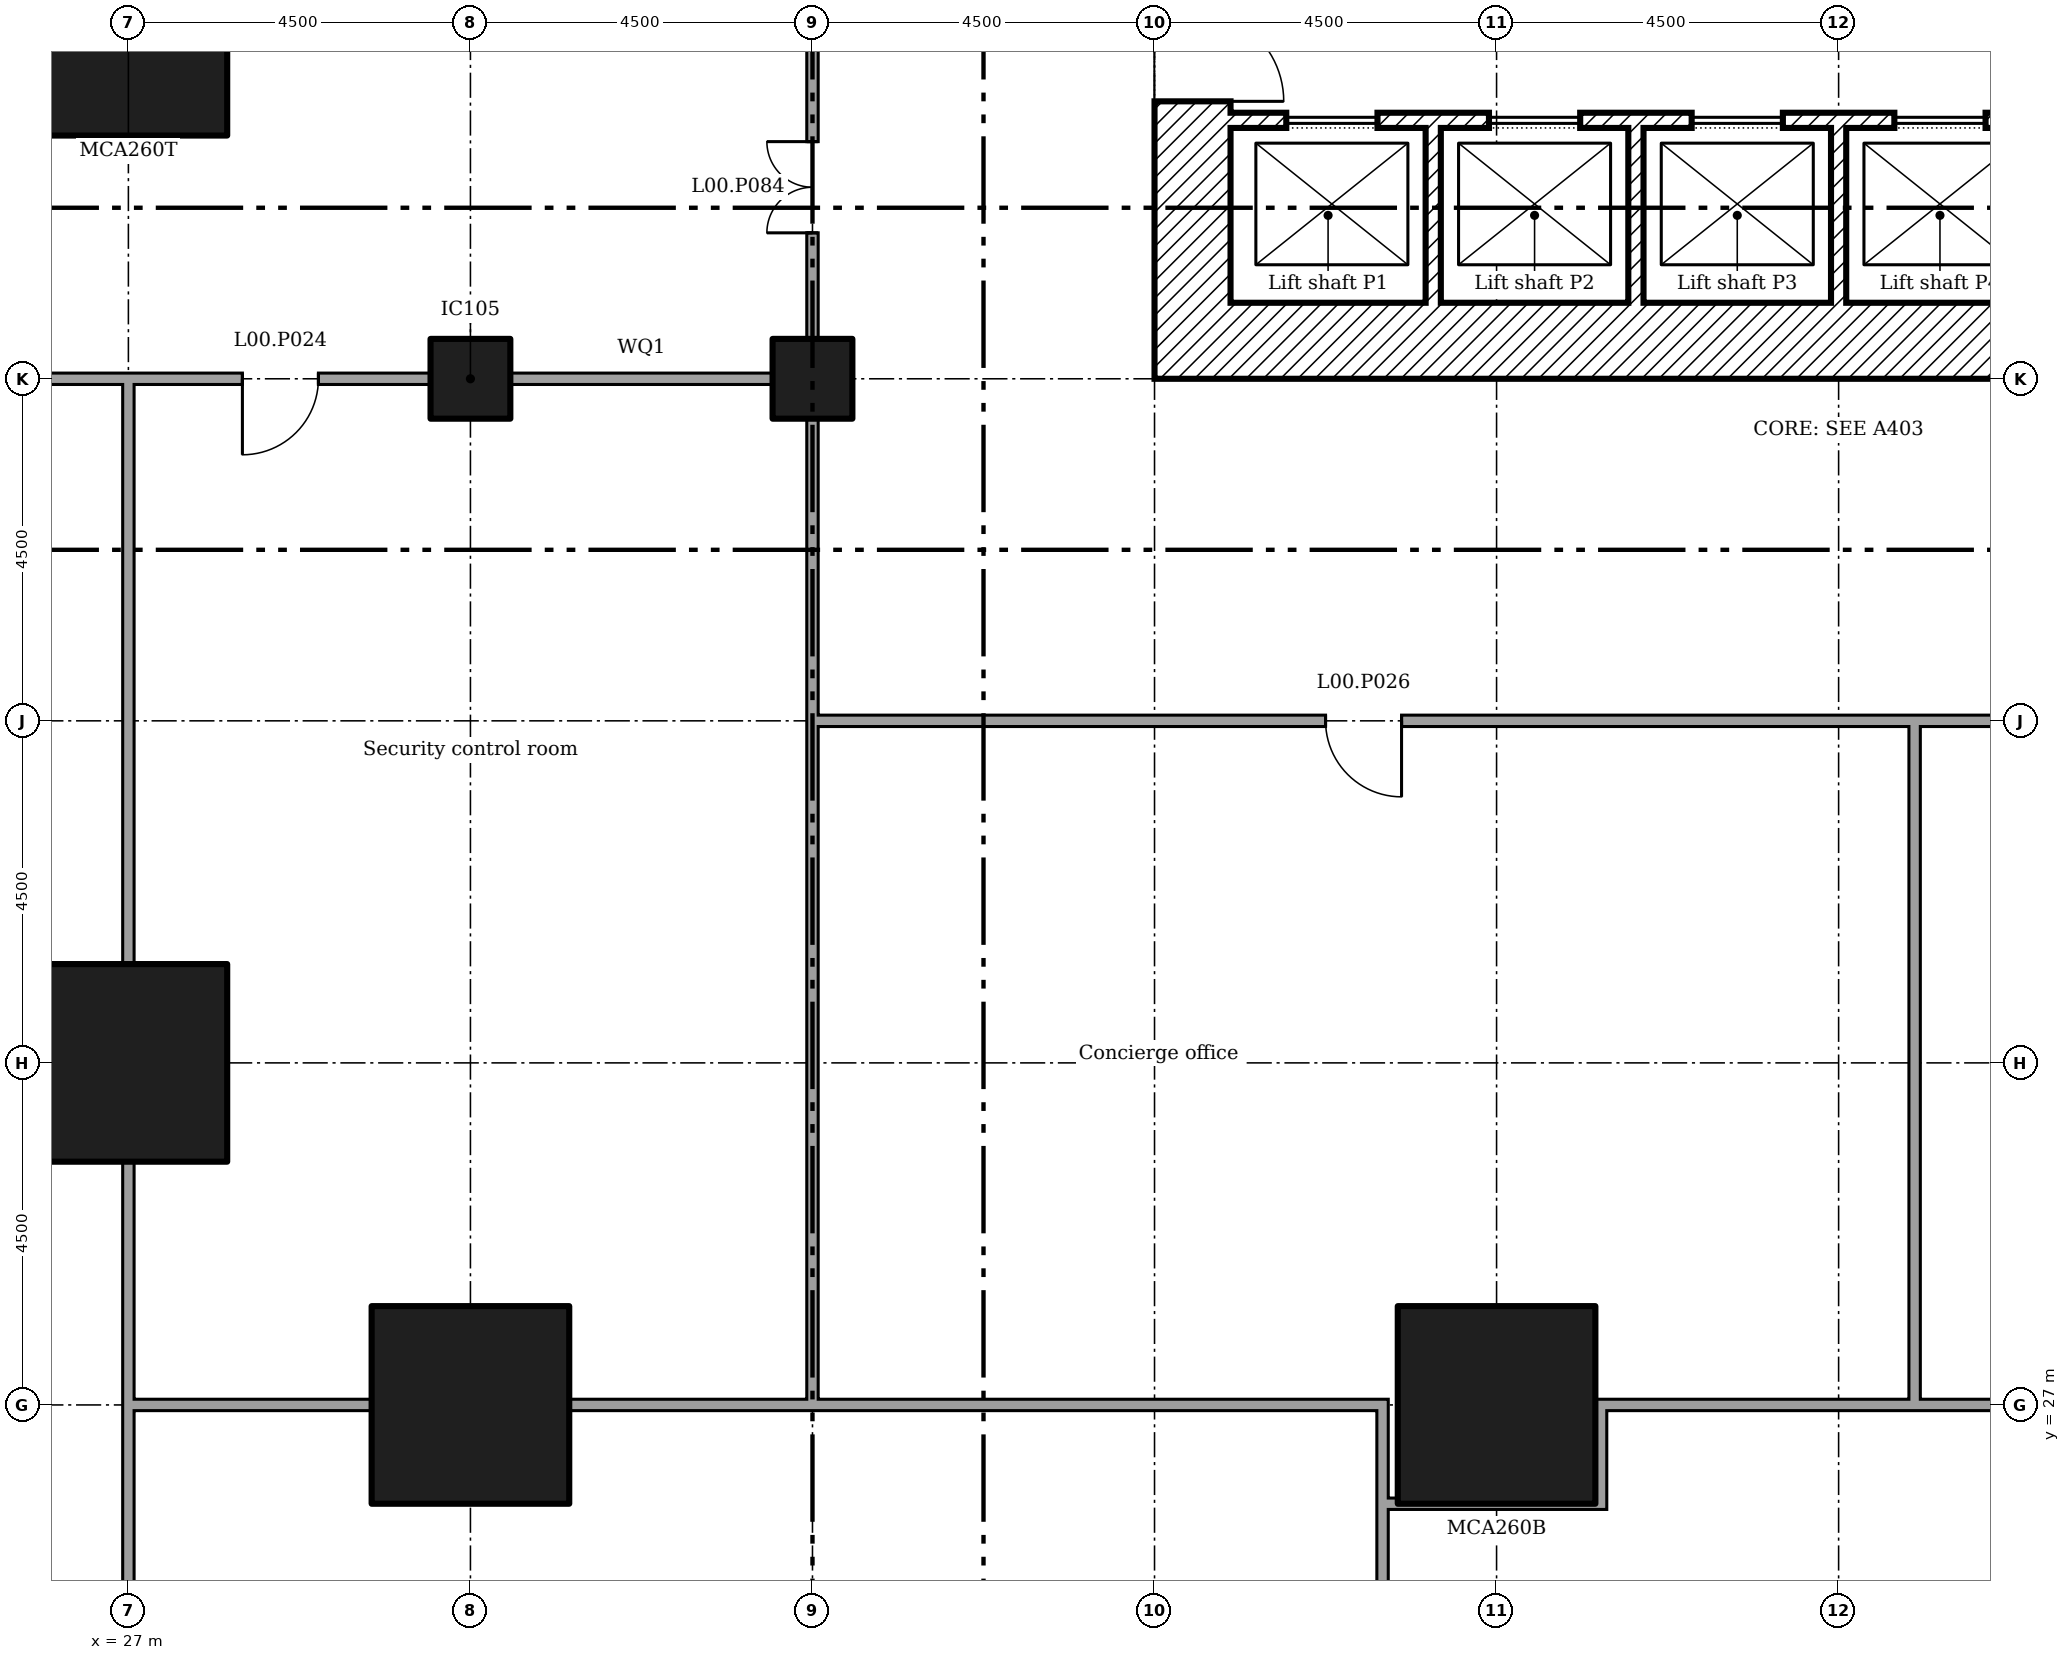
"""IFC4 building model, lengths in metres.
Left out: names, types, materials, properties, quantities, classifications, styles, units other than length and angle.
Written with IfcOpenShell. Run it as: python <this file> out.ifc"""

import sys

from ifc_helpers import new_model, si_unit, direction, frame, frame_2d, origin, origin_2d, place, context, subcontext, project, spatial, rectangle, extrude, element, fill, save


model = new_model("IFC4")
c1 = context("Model", 3, precision=1e-05, world=origin(), true_north=direction((0.0, 1.0)))
c2 = subcontext(c1, "Body", "Model", "MODEL_VIEW")
j1 = project(units=[si_unit("LENGTHUNIT", "METRE"), si_unit("PLANEANGLEUNIT", "RADIAN")], contexts=[c1])
p1 = place(None, origin())
s1 = spatial("IfcSite", under=j1, at=p1, CompositionType="ELEMENT")
p2 = place(p1, origin())
s2 = spatial("IfcBuilding", under=s1, at=p2, CompositionType="ELEMENT")
p3 = place(p2, origin())
s3 = spatial("IfcBuildingStorey", under=s2, at=p3, CompositionType="ELEMENT", Elevation=0.0)
for number, where in (
    (1, (27.0, 31.5, 0.0)),
    (2, (27.0, 45.0, 0.0)),
    (3, (31.5, 27.0, 0.0)),
    (4, (45.0, 27.0, 0.0)),
):
    element("IfcColumn", number, at=place(p3, frame(where)), inside=s3, PredefinedType="COLUMN", context=c2, shape_type="SweptSolid", body=[
        extrude(rectangle(XDim=2.6, YDim=2.6, at=origin_2d()), origin(), (0.0, 0.0, 1.0), 6.0),
    ])
for number, where in (
    (5, (31.5, 40.5, 0.0)),
    (6, (36.0, 40.5, 0.0)),
):
    element("IfcColumn", number, at=place(p3, frame(where)), inside=s3, PredefinedType="COLUMN", context=c2, shape_type="SweptSolid", body=[
        extrude(rectangle(XDim=1.05, YDim=1.05, at=origin_2d()), origin(), (0.0, 0.0, 1.0), 6.0),
    ])
p4 = place(p3, frame((41.5, 41.0, 0.0)))
e7 = element("IfcWall", 7, at=p4, inside=s3, PredefinedType="SHEAR", context=c2, shape_type="SweptSolid", body=[
    extrude(rectangle(XDim=16.0, YDim=1.0, at=frame_2d((8.0, 0.0))), origin(), (0.0, 0.0, 1.0), 5.5),
])
p5 = place(p3, frame((41.0, 40.5, 0.0), z_axis=(0.0, 0.0, 1.0), x_axis=(0.0, 1.0, 0.0)))
e8 = element("IfcWall", 8, at=p5, inside=s3, PredefinedType="SHEAR", context=c2, shape_type="SweptSolid", body=[
    extrude(rectangle(XDim=18.0, YDim=1.0, at=frame_2d((9.0, 0.0))), origin(), (0.0, 0.0, 1.0), 5.5),
])
p6 = place(p5, frame((3.65, 0.0, 0.0)))
e9 = element("IfcOpeningElement", 9, at=p6, cuts=e8, PredefinedType="OPENING", context=c2, shape_type="SweptSolid", body=[
    extrude(rectangle(XDim=1.2, YDim=2.1, at=frame_2d((0.6, 1.05))), frame((0.0, 0.51, 0.0), z_axis=(0.0, -1.0, 0.0), x_axis=(1.0, 0.0, 0.0)), (0.0, 0.0, 1.0), 1.02),
])
p7 = place(p5, frame((5.475, 0.0, 0.0)))
e10 = element("IfcOpeningElement", 10, at=p7, cuts=e8, PredefinedType="OPENING", context=c2, shape_type="SweptSolid", body=[
    extrude(rectangle(XDim=1.0, YDim=2.1, at=frame_2d((0.5, 1.05))), frame((0.0, 0.51, 0.0), z_axis=(0.0, -1.0, 0.0), x_axis=(1.0, 0.0, 0.0)), (0.0, 0.0, 1.0), 1.02),
])
p8 = place(p5, frame((12.3, 0.0, 0.0)))
e11 = element("IfcOpeningElement", 11, at=p8, cuts=e8, PredefinedType="OPENING", context=c2, shape_type="SweptSolid", body=[
    extrude(rectangle(XDim=1.0, YDim=2.1, at=frame_2d((0.5, 1.05))), frame((0.0, 0.51, 0.0), z_axis=(0.0, -1.0, 0.0), x_axis=(1.0, 0.0, 0.0)), (0.0, 0.0, 1.0), 1.02),
])
for number, where, z_axis, x_axis in (
    (12, (44.167, 41.5, 0.0), (0.0, 0.0, 1.0), (0.0, 1.0, 0.0)),
    (13, (46.833, 41.5, 0.0), (0.0, 0.0, 1.0), (0.0, 1.0, 0.0)),
    (14, (49.5, 41.5, 0.0), (0.0, 0.0, 1.0), (0.0, 1.0, 0.0)),
):
    element("IfcWall", number, at=place(p3, frame(where, z_axis=z_axis, x_axis=x_axis)), inside=s3, PredefinedType="SHEAR", context=c2, shape_type="SweptSolid", body=[
        extrude(rectangle(XDim=2.3, YDim=0.2, at=frame_2d((1.15, 0.0))), origin(), (0.0, 0.0, 1.0), 5.5),
    ])
p9 = place(p3, frame((41.5, 43.9, 0.0)))
e15 = element("IfcWall", 15, at=p9, inside=s3, PredefinedType="SHEAR", context=c2, shape_type="SweptSolid", body=[
    extrude(rectangle(XDim=16.0, YDim=0.2, at=frame_2d((8.0, 0.0))), origin(), (0.0, 0.0, 1.0), 5.5),
])
p10 = place(p9, frame((14.067, 0.0, 0.0)))
e16 = element("IfcOpeningElement", 16, at=p10, cuts=e15, PredefinedType="OPENING", context=c2, shape_type="SweptSolid", body=[
    extrude(rectangle(XDim=1.2, YDim=2.1, at=frame_2d((0.6, 1.05))), frame((0.0, 0.11, 0.0), z_axis=(0.0, -1.0, 0.0), x_axis=(1.0, 0.0, 0.0)), (0.0, 0.0, 1.0), 0.22),
])
p11 = place(p9, frame((0.733, 0.0, 0.0)))
e17 = element("IfcOpeningElement", 17, at=p11, cuts=e15, PredefinedType="OPENING", context=c2, shape_type="SweptSolid", body=[
    extrude(rectangle(XDim=1.2, YDim=2.1, at=frame_2d((0.6, 1.05))), frame((0.0, 0.11, 0.0), z_axis=(0.0, -1.0, 0.0), x_axis=(1.0, 0.0, 0.0)), (0.0, 0.0, 1.0), 0.22),
])
p12 = place(p9, frame((3.4, 0.0, 0.0)))
e18 = element("IfcOpeningElement", 18, at=p12, cuts=e15, PredefinedType="OPENING", context=c2, shape_type="SweptSolid", body=[
    extrude(rectangle(XDim=1.2, YDim=2.1, at=frame_2d((0.6, 1.05))), frame((0.0, 0.11, 0.0), z_axis=(0.0, -1.0, 0.0), x_axis=(1.0, 0.0, 0.0)), (0.0, 0.0, 1.0), 0.22),
])
p13 = place(p9, frame((6.067, 0.0, 0.0)))
e19 = element("IfcOpeningElement", 19, at=p13, cuts=e15, PredefinedType="OPENING", context=c2, shape_type="SweptSolid", body=[
    extrude(rectangle(XDim=1.2, YDim=2.1, at=frame_2d((0.6, 1.05))), frame((0.0, 0.11, 0.0), z_axis=(0.0, -1.0, 0.0), x_axis=(1.0, 0.0, 0.0)), (0.0, 0.0, 1.0), 0.22),
])
p14 = place(p9, frame((8.733, 0.0, 0.0)))
e20 = element("IfcOpeningElement", 20, at=p14, cuts=e15, PredefinedType="OPENING", context=c2, shape_type="SweptSolid", body=[
    extrude(rectangle(XDim=1.2, YDim=2.1, at=frame_2d((0.6, 1.05))), frame((0.0, 0.11, 0.0), z_axis=(0.0, -1.0, 0.0), x_axis=(1.0, 0.0, 0.0)), (0.0, 0.0, 1.0), 0.22),
])
p15 = place(p9, frame((11.4, 0.0, 0.0)))
e21 = element("IfcOpeningElement", 21, at=p15, cuts=e15, PredefinedType="OPENING", context=c2, shape_type="SweptSolid", body=[
    extrude(rectangle(XDim=1.2, YDim=2.1, at=frame_2d((0.6, 1.05))), frame((0.0, 0.11, 0.0), z_axis=(0.0, -1.0, 0.0), x_axis=(1.0, 0.0, 0.0)), (0.0, 0.0, 1.0), 0.22),
])
p16 = place(p3, frame((18.075, 40.5, 0.0)))
e22 = element("IfcWall", 22, at=p16, inside=s3, PredefinedType="PARTITIONING", context=c2, shape_type="SweptSolid", body=[
    extrude(rectangle(XDim=9.0, YDim=0.15, at=frame_2d((4.5, 0.0))), origin(), (0.0, 0.0, 1.0), 5.55),
])
p17 = place(p3, frame((27.0, 18.075, 0.0), z_axis=(0.0, 0.0, 1.0), x_axis=(0.0, 1.0, 0.0)))
e23 = element("IfcWall", 23, at=p17, inside=s3, PredefinedType="PARTITIONING", context=c2, shape_type="SweptSolid", body=[
    extrude(rectangle(XDim=9.0, YDim=0.15, at=frame_2d((4.5, 0.0))), origin(), (0.0, 0.0, 1.0), 5.55),
])
p18 = place(p3, frame((27.0, 27.0, 0.0), z_axis=(0.0, 0.0, 1.0), x_axis=(0.0, 1.0, 0.0)))
e24 = element("IfcWall", 24, at=p18, inside=s3, PredefinedType="PARTITIONING", context=c2, shape_type="SweptSolid", body=[
    extrude(rectangle(XDim=3.205, YDim=0.15, at=frame_2d((1.603, 0.0))), origin(), (0.0, 0.0, 1.0), 5.55),
])
p19 = place(p3, frame((27.0, 32.795, 0.0), z_axis=(0.0, 0.0, 1.0), x_axis=(0.0, 1.0, 0.0)))
e25 = element("IfcWall", 25, at=p19, inside=s3, PredefinedType="PARTITIONING", context=c2, shape_type="SweptSolid", body=[
    extrude(rectangle(XDim=7.63, YDim=0.15, at=frame_2d((3.815, 0.0))), origin(), (0.0, 0.0, 1.0), 5.55),
])
p20 = place(p3, frame((27.0, 40.5, 0.0)))
e26 = element("IfcWall", 26, at=p20, inside=s3, PredefinedType="PARTITIONING", context=c2, shape_type="SweptSolid", body=[
    extrude(rectangle(XDim=3.98, YDim=0.15, at=frame_2d((1.99, 0.0))), origin(), (0.0, 0.0, 1.0), 5.55),
])
p21 = place(p20, frame((1.5, 0.0, 0.0)))
e27 = element("IfcOpeningElement", 27, at=p21, cuts=e26, PredefinedType="OPENING", context=c2, shape_type="SweptSolid", body=[
    extrude(rectangle(XDim=1.0, YDim=2.1, at=frame_2d((0.5, 1.05))), frame((0.0, 0.085, 0.0), z_axis=(0.0, -1.0, 0.0), x_axis=(1.0, 0.0, 0.0)), (0.0, 0.0, 1.0), 0.17),
])
p22 = place(p3, frame((32.02, 40.5, 0.0)))
e28 = element("IfcWall", 28, at=p22, inside=s3, PredefinedType="PARTITIONING", context=c2, shape_type="SweptSolid", body=[
    extrude(rectangle(XDim=3.46, YDim=0.15, at=frame_2d((1.73, 0.0))), origin(), (0.0, 0.0, 1.0), 5.55),
])
p23 = place(p3, frame((36.0, 41.02, 0.0), z_axis=(0.0, 0.0, 1.0), x_axis=(0.0, 1.0, 0.0)))
e29 = element("IfcWall", 29, at=p23, inside=s3, PredefinedType="PARTITIONING", context=c2, shape_type="SweptSolid", body=[
    extrude(rectangle(XDim=3.905, YDim=0.15, at=frame_2d((1.953, 0.0))), origin(), (0.0, 0.0, 1.0), 5.55),
])
p24 = place(p23, frame((1.4, 0.0, 0.0)))
e30 = element("IfcOpeningElement", 30, at=p24, cuts=e29, PredefinedType="OPENING", context=c2, shape_type="SweptSolid", body=[
    extrude(rectangle(XDim=1.2, YDim=2.1, at=frame_2d((0.6, 1.05))), frame((0.0, 0.085, 0.0), z_axis=(0.0, -1.0, 0.0), x_axis=(1.0, 0.0, 0.0)), (0.0, 0.0, 1.0), 0.17),
])
p25 = place(p3, frame((43.5, 18.075, 0.0), z_axis=(0.0, 0.0, 1.0), x_axis=(0.0, 1.0, 0.0)))
e31 = element("IfcWall", 31, at=p25, inside=s3, PredefinedType="PARTITIONING", context=c2, shape_type="SweptSolid", body=[
    extrude(rectangle(XDim=7.7, YDim=0.15, at=frame_2d((3.85, 0.0))), origin(), (0.0, 0.0, 1.0), 5.55),
])
p26 = place(p3, frame((27.075, 27.0, 0.0)))
e32 = element("IfcWall", 32, at=p26, inside=s3, PredefinedType="PARTITIONING", context=c2, shape_type="SweptSolid", body=[
    extrude(rectangle(XDim=3.13, YDim=0.15, at=frame_2d((1.565, 0.0))), origin(), (0.0, 0.0, 1.0), 5.55),
])
p27 = place(p3, frame((32.795, 27.0, 0.0)))
e33 = element("IfcWall", 33, at=p27, inside=s3, PredefinedType="PARTITIONING", context=c2, shape_type="SweptSolid", body=[
    extrude(rectangle(XDim=3.28, YDim=0.15, at=frame_2d((1.64, 0.0))), origin(), (0.0, 0.0, 1.0), 5.55),
])
p28 = place(p3, frame((43.5, 25.7, 0.0), z_axis=(0.0, 0.0, 1.0), x_axis=(0.0, 1.0, 0.0)))
e34 = element("IfcWall", 34, at=p28, inside=s3, PredefinedType="PARTITIONING", context=c2, shape_type="SweptSolid", body=[
    extrude(rectangle(XDim=1.375, YDim=0.15, at=frame_2d((0.688, 0.0))), origin(), (0.0, 0.0, 1.0), 5.55),
])
p29 = place(p3, frame((36.0, 27.0, 0.0)))
e35 = element("IfcWall", 35, at=p29, inside=s3, PredefinedType="PARTITIONING", context=c2, shape_type="SweptSolid", body=[
    extrude(rectangle(XDim=7.425, YDim=0.15, at=frame_2d((3.712, 0.0))), origin(), (0.0, 0.0, 1.0), 5.55),
])
p30 = place(p3, frame((46.375, 25.625, 0.0), z_axis=(0.0, 0.0, 1.0), x_axis=(0.0, 1.0, 0.0)))
e36 = element("IfcWall", 36, at=p30, inside=s3, PredefinedType="PARTITIONING", context=c2, shape_type="SweptSolid", body=[
    extrude(rectangle(XDim=1.45, YDim=0.15, at=frame_2d((0.725, 0.0))), origin(), (0.0, 0.0, 1.0), 5.55),
])
p31 = place(p3, frame((43.575, 25.7, 0.0)))
e37 = element("IfcWall", 37, at=p31, inside=s3, PredefinedType="PARTITIONING", context=c2, shape_type="SweptSolid", body=[
    extrude(rectangle(XDim=2.725, YDim=0.15, at=frame_2d((1.363, 0.0))), origin(), (0.0, 0.0, 1.0), 5.55),
])
p32 = place(p3, frame((46.45, 27.0, 0.0)))
e38 = element("IfcWall", 38, at=p32, inside=s3, PredefinedType="PARTITIONING", context=c2, shape_type="SweptSolid", body=[
    extrude(rectangle(XDim=4.125, YDim=0.15, at=frame_2d((2.062, 0.0))), origin(), (0.0, 0.0, 1.0), 5.55),
])
p33 = place(p3, frame((50.5, 27.0, 0.0)))
e39 = element("IfcWall", 39, at=p33, inside=s3, PredefinedType="PARTITIONING", context=c2, shape_type="SweptSolid", body=[
    extrude(rectangle(XDim=6.55, YDim=0.15, at=frame_2d((3.275, 0.0))), origin(), (0.0, 0.0, 1.0), 5.55),
])
p34 = place(p3, frame((36.0, 27.075, 0.0), z_axis=(0.0, 0.0, 1.0), x_axis=(0.0, 1.0, 0.0)))
e40 = element("IfcWall", 40, at=p34, inside=s3, PredefinedType="PARTITIONING", context=c2, shape_type="SweptSolid", body=[
    extrude(rectangle(XDim=9.0, YDim=0.15, at=frame_2d((4.5, 0.0))), origin(), (0.0, 0.0, 1.0), 5.55),
])
p35 = place(p3, frame((36.0, 36.0, 0.0), z_axis=(0.0, 0.0, 1.0), x_axis=(0.0, 1.0, 0.0)))
e41 = element("IfcWall", 41, at=p35, inside=s3, PredefinedType="PARTITIONING", context=c2, shape_type="SweptSolid", body=[
    extrude(rectangle(XDim=3.98, YDim=0.15, at=frame_2d((1.99, 0.0))), origin(), (0.0, 0.0, 1.0), 5.55),
])
p36 = place(p3, frame((50.5, 27.075, 0.0), z_axis=(0.0, 0.0, 1.0), x_axis=(0.0, 1.0, 0.0)))
e42 = element("IfcWall", 42, at=p36, inside=s3, PredefinedType="PARTITIONING", context=c2, shape_type="SweptSolid", body=[
    extrude(rectangle(XDim=9.0, YDim=0.15, at=frame_2d((4.5, 0.0))), origin(), (0.0, 0.0, 1.0), 5.55),
])
p37 = place(p3, frame((36.075, 36.0, 0.0)))
e43 = element("IfcWall", 43, at=p37, inside=s3, PredefinedType="PARTITIONING", context=c2, shape_type="SweptSolid", body=[
    extrude(rectangle(XDim=14.425, YDim=0.15, at=frame_2d((7.212, 0.0))), origin(), (0.0, 0.0, 1.0), 5.55),
])
p38 = place(p37, frame((6.675, 0.0, 0.0)))
e44 = element("IfcOpeningElement", 44, at=p38, cuts=e43, PredefinedType="OPENING", context=c2, shape_type="SweptSolid", body=[
    extrude(rectangle(XDim=1.0, YDim=2.1, at=frame_2d((0.5, 1.05))), frame((0.0, 0.085, 0.0), z_axis=(0.0, -1.0, 0.0), x_axis=(1.0, 0.0, 0.0)), (0.0, 0.0, 1.0), 0.17),
])
p39 = place(p3, frame((50.575, 36.0, 0.0)))
e45 = element("IfcWall", 45, at=p39, inside=s3, PredefinedType="PARTITIONING", context=c2, shape_type="SweptSolid", body=[
    extrude(rectangle(XDim=7.405, YDim=0.15, at=frame_2d((3.703, 0.0))), origin(), (0.0, 0.0, 1.0), 5.55),
])
p40 = place(p6, frame((1.2, 0.0, 0.0), x_axis=(-1.0, 0.0, 0.0)))
e46 = element("IfcDoor", 46, at=p40, inside=s3, OperationType="SINGLE_SWING_LEFT", PredefinedType="DOOR", context=c2, shape_type="SweptSolid", body=[
    extrude(rectangle(XDim=1.2, YDim=2.1, at=frame_2d((0.6, 1.05))), frame((0.0, 0.025, 0.0), z_axis=(0.0, -1.0, 0.0), x_axis=(1.0, 0.0, 0.0)), (0.0, 0.0, 1.0), 0.05),
])
fill(e9, e46)
p41 = place(p11, origin())
e47 = element("IfcDoor", 47, at=p41, inside=s3, OperationType="SLIDING_TO_LEFT", PredefinedType="DOOR", context=c2, shape_type="SweptSolid", body=[
    extrude(rectangle(XDim=1.2, YDim=2.1, at=frame_2d((0.6, 1.05))), frame((0.0, 0.025, 0.0), z_axis=(0.0, -1.0, 0.0), x_axis=(1.0, 0.0, 0.0)), (0.0, 0.0, 1.0), 0.05),
])
fill(e17, e47)
p42 = place(p12, origin())
e48 = element("IfcDoor", 48, at=p42, inside=s3, OperationType="SLIDING_TO_LEFT", PredefinedType="DOOR", context=c2, shape_type="SweptSolid", body=[
    extrude(rectangle(XDim=1.2, YDim=2.1, at=frame_2d((0.6, 1.05))), frame((0.0, 0.025, 0.0), z_axis=(0.0, -1.0, 0.0), x_axis=(1.0, 0.0, 0.0)), (0.0, 0.0, 1.0), 0.05),
])
fill(e18, e48)
p43 = place(p13, origin())
e49 = element("IfcDoor", 49, at=p43, inside=s3, OperationType="SLIDING_TO_LEFT", PredefinedType="DOOR", context=c2, shape_type="SweptSolid", body=[
    extrude(rectangle(XDim=1.2, YDim=2.1, at=frame_2d((0.6, 1.05))), frame((0.0, 0.025, 0.0), z_axis=(0.0, -1.0, 0.0), x_axis=(1.0, 0.0, 0.0)), (0.0, 0.0, 1.0), 0.05),
])
fill(e19, e49)
p44 = place(p14, origin())
e50 = element("IfcDoor", 50, at=p44, inside=s3, OperationType="SLIDING_TO_LEFT", PredefinedType="DOOR", context=c2, shape_type="SweptSolid", body=[
    extrude(rectangle(XDim=1.2, YDim=2.1, at=frame_2d((0.6, 1.05))), frame((0.0, 0.025, 0.0), z_axis=(0.0, -1.0, 0.0), x_axis=(1.0, 0.0, 0.0)), (0.0, 0.0, 1.0), 0.05),
])
fill(e20, e50)
p45 = place(p21, frame((1.0, 0.0, 0.0), x_axis=(-1.0, 0.0, 0.0)))
e51 = element("IfcDoor", 51, at=p45, inside=s3, OperationType="SINGLE_SWING_LEFT", PredefinedType="DOOR", context=c2, shape_type="SweptSolid", body=[
    extrude(rectangle(XDim=1.0, YDim=2.1, at=frame_2d((0.5, 1.05))), frame((0.0, 0.025, 0.0), z_axis=(0.0, -1.0, 0.0), x_axis=(1.0, 0.0, 0.0)), (0.0, 0.0, 1.0), 0.05),
])
fill(e27, e51)
p46 = place(p38, frame((1.0, 0.0, 0.0), x_axis=(-1.0, 0.0, 0.0)))
e52 = element("IfcDoor", 52, at=p46, inside=s3, OperationType="SINGLE_SWING_RIGHT", PredefinedType="DOOR", context=c2, shape_type="SweptSolid", body=[
    extrude(rectangle(XDim=1.0, YDim=2.1, at=frame_2d((0.5, 1.05))), frame((0.0, 0.025, 0.0), z_axis=(0.0, -1.0, 0.0), x_axis=(1.0, 0.0, 0.0)), (0.0, 0.0, 1.0), 0.05),
])
fill(e44, e52)
p47 = place(p24, origin())
e53 = element("IfcDoor", 53, at=p47, inside=s3, OperationType="DOUBLE_DOOR_SINGLE_SWING", PredefinedType="DOOR", context=c2, shape_type="SweptSolid", body=[
    extrude(rectangle(XDim=1.2, YDim=2.1, at=frame_2d((0.6, 1.05))), frame((0.0, 0.025, 0.0), z_axis=(0.0, -1.0, 0.0), x_axis=(1.0, 0.0, 0.0)), (0.0, 0.0, 1.0), 0.05),
])
fill(e30, e53)
save(model, sys.argv[1])
